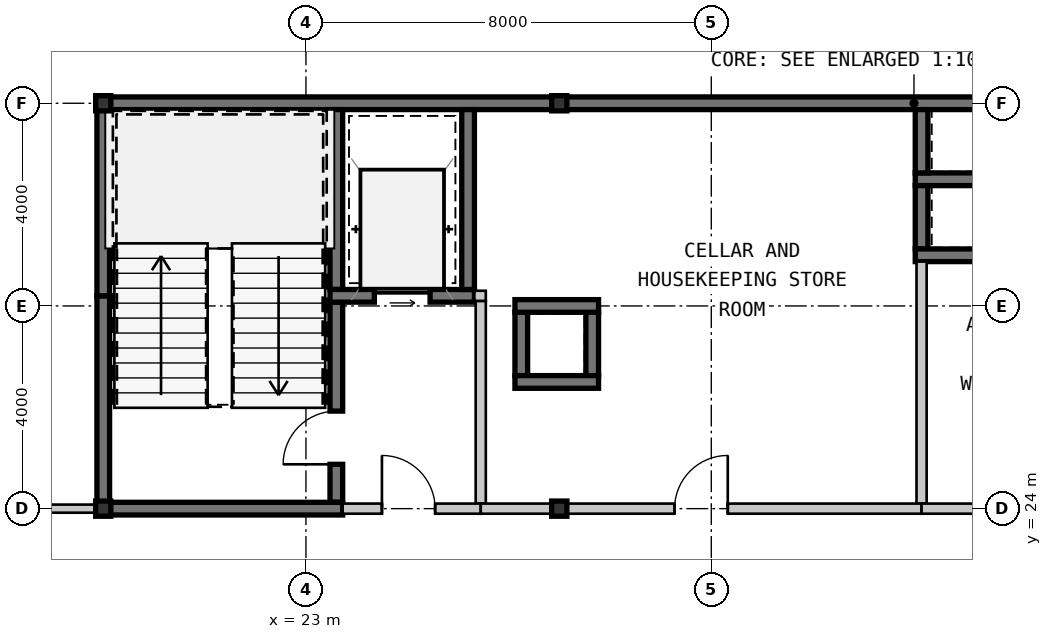
"""IFC4 building model, lengths in metres.
Left out: names, types, materials, properties, quantities, classifications, styles, units other than length and angle.
Written with IfcOpenShell. Run it as: python <this file> out.ifc"""

import sys

from ifc_helpers import new_model, si_unit, direction, frame, frame_2d, origin, origin_2d, place, context, subcontext, project, spatial, rectangle, hollow_rectangle, extrude, source, transform, mapped, element, fill, save


model = new_model("IFC4")
c1 = context("Model", 3, precision=1e-05, world=origin(), true_north=direction((0.0, 1.0)))
c2 = subcontext(c1, "Body", "Model", "MODEL_VIEW")
j1 = project(units=[si_unit("LENGTHUNIT", "METRE"), si_unit("PLANEANGLEUNIT", "RADIAN")], contexts=[c1])
p1 = place(None, origin())
s1 = spatial("IfcSite", under=j1, at=p1, CompositionType="ELEMENT")
p2 = place(p1, origin())
s2 = spatial("IfcBuilding", under=s1, at=p2, CompositionType="ELEMENT")
p3 = place(p2, frame((0.0, 0.0, 236.6)))
s3 = spatial("IfcBuildingStorey", under=s2, at=p3, CompositionType="ELEMENT", Elevation=236.6)
m1 = source(origin(), c2, "Body", "SweptSolid", [
    extrude(hollow_rectangle(XDim=0.3, YDim=0.3, WallThickness=0.012, at=origin_2d()), origin(), (0.0, 0.0, 1.0), 3.15),
])
for number, where, z_axis, x_axis in (
    (1, (19.0, 24.0, 0.0), (0.0, 0.0, 1.0), (1.0, 0.0, 0.0)),
    (2, (28.0, 24.0, 0.0), (0.0, 0.0, 1.0), (1.0, 0.0, 0.0)),
    (3, (19.0, 32.0, 0.0), (0.0, 0.0, 1.0), (1.0, 0.0, 0.0)),
    (4, (28.0, 32.0, 0.0), (0.0, 0.0, 1.0), (1.0, 0.0, 0.0)),
):
    element("IfcColumn", number, at=place(p3, frame(where, z_axis=z_axis, x_axis=x_axis)), inside=s3, PredefinedType="COLUMN", context=c2, shape_type="MappedRepresentation", body=[
        mapped(m1, transform((0.0, 0.0, 0.0), scale=1.0)),
    ])
m2 = source(origin(), c2, "Body", "SweptSolid", [
    extrude(rectangle(XDim=9.125, YDim=0.25, at=frame_2d((4.562, 0.0))), origin(), (0.0, 0.0, 1.0), 2.93),
])
p4 = place(p3, frame((18.875, 32.0, 0.0), z_axis=(0.0, 0.0, 1.0), x_axis=(1.0, 0.0, 0.0)))
e5 = element("IfcWall", 5, at=p4, inside=s3, PredefinedType="SHEAR", context=c2, shape_type="MappedRepresentation", body=[
    mapped(m2, transform((0.0, 0.0, 0.0), scale=1.0)),
])
m3 = source(origin(), c2, "Body", "SweptSolid", [
    extrude(rectangle(XDim=11.2, YDim=0.25, at=frame_2d((5.6, 0.0))), origin(), (0.0, 0.0, 1.0), 2.93),
])
p5 = place(p3, frame((28.0, 32.0, 0.0), z_axis=(0.0, 0.0, 1.0), x_axis=(1.0, 0.0, 0.0)))
e6 = element("IfcWall", 6, at=p5, inside=s3, PredefinedType="SHEAR", context=c2, shape_type="MappedRepresentation", body=[
    mapped(m3, transform((0.0, 0.0, 0.0), scale=1.0)),
])
m4 = source(origin(), c2, "Body", "SweptSolid", [
    extrude(rectangle(XDim=4.075, YDim=0.25, at=frame_2d((2.038, 0.0))), origin(), (0.0, 0.0, 1.0), 2.93),
])
p6 = place(p3, frame((19.0, 24.125, 0.0), z_axis=(0.0, 0.0, 1.0), x_axis=(0.0, 1.0, 0.0)))
e7 = element("IfcWall", 7, at=p6, inside=s3, PredefinedType="SHEAR", context=c2, shape_type="MappedRepresentation", body=[
    mapped(m4, transform((0.0, 0.0, 0.0), scale=1.0)),
])
m5 = source(origin(), c2, "Body", "SweptSolid", [
    extrude(rectangle(XDim=3.675, YDim=0.25, at=frame_2d((1.837, 0.0))), origin(), (0.0, 0.0, 1.0), 2.93),
])
p7 = place(p3, frame((19.0, 28.2, 0.0), z_axis=(0.0, 0.0, 1.0), x_axis=(0.0, 1.0, 0.0)))
e8 = element("IfcWall", 8, at=p7, inside=s3, PredefinedType="SHEAR", context=c2, shape_type="MappedRepresentation", body=[
    mapped(m5, transform((0.0, 0.0, 0.0), scale=1.0)),
])
m6 = source(origin(), c2, "Body", "SweptSolid", [
    extrude(rectangle(XDim=3.55, YDim=0.25, at=frame_2d((1.775, 0.0))), origin(), (0.0, 0.0, 1.0), 2.93),
])
p8 = place(p3, frame((23.6, 28.325, 0.0), z_axis=(0.0, 0.0, 1.0), x_axis=(0.0, 1.0, 0.0)))
e9 = element("IfcWall", 9, at=p8, inside=s3, PredefinedType="SHEAR", context=c2, shape_type="MappedRepresentation", body=[
    mapped(m6, transform((0.0, 0.0, 0.0), scale=1.0)),
])
m7 = source(origin(), c2, "Body", "SweptSolid", [
    extrude(rectangle(XDim=3.95, YDim=0.25, at=frame_2d((1.975, 0.0))), origin(), (0.0, 0.0, 1.0), 2.93),
])
p9 = place(p3, frame((23.6, 24.125, 0.0), z_axis=(0.0, 0.0, 1.0), x_axis=(0.0, 1.0, 0.0)))
e10 = element("IfcWall", 10, at=p9, inside=s3, PredefinedType="SHEAR", context=c2, shape_type="MappedRepresentation", body=[
    mapped(m7, transform((0.0, 0.0, 0.0), scale=1.0)),
])
m8 = source(origin(), c2, "Body", "SweptSolid", [
    extrude(rectangle(XDim=1.05, YDim=2.1, at=frame_2d((0.525, 1.05))), frame((0.0, 0.135, 0.0), z_axis=(0.0, -1.0, 0.0), x_axis=(1.0, 0.0, 0.0)), (0.0, 0.0, 1.0), 0.27),
])
p10 = place(p9, frame((0.75, 0.0, 0.0)))
e11 = element("IfcOpeningElement", 11, at=p10, cuts=e10, PredefinedType="OPENING", context=c2, shape_type="MappedRepresentation", body=[
    mapped(m8, transform((0.0, 0.0, 0.0), scale=1.0)),
])
m9 = source(origin(), c2, "Body", "SweptSolid", [
    extrude(rectangle(XDim=4.85, YDim=0.25, at=frame_2d((2.425, 0.0))), origin(), (0.0, 0.0, 1.0), 2.93),
])
p11 = place(p3, frame((18.875, 24.0, 0.0), z_axis=(0.0, 0.0, 1.0), x_axis=(1.0, 0.0, 0.0)))
e12 = element("IfcWall", 12, at=p11, inside=s3, PredefinedType="SHEAR", context=c2, shape_type="MappedRepresentation", body=[
    mapped(m9, transform((0.0, 0.0, 0.0), scale=1.0)),
])
m10 = source(origin(), c2, "Body", "SweptSolid", [
    extrude(rectangle(XDim=2.85, YDim=0.25, at=frame_2d((1.425, 0.0))), origin(), (0.0, 0.0, 1.0), 2.93),
])
p12 = place(p3, frame((23.475, 28.2, 0.0), z_axis=(0.0, 0.0, 1.0), x_axis=(1.0, 0.0, 0.0)))
e13 = element("IfcWall", 13, at=p12, inside=s3, PredefinedType="SHEAR", context=c2, shape_type="MappedRepresentation", body=[
    mapped(m10, transform((0.0, 0.0, 0.0), scale=1.0)),
])
m11 = source(origin(), c2, "Body", "SweptSolid", [
    extrude(rectangle(XDim=1.1, YDim=2.15, at=frame_2d((0.55, 1.075))), frame((0.0, 0.135, 0.0), z_axis=(0.0, -1.0, 0.0), x_axis=(1.0, 0.0, 0.0)), (0.0, 0.0, 1.0), 0.27),
])
p13 = place(p12, frame((0.875, 0.0, 0.0)))
e14 = element("IfcOpeningElement", 14, at=p13, cuts=e13, PredefinedType="OPENING", context=c2, shape_type="MappedRepresentation", body=[
    mapped(m11, transform((0.0, 0.0, 0.0), scale=1.0)),
])
p14 = place(p3, frame((26.2, 28.325, 0.0), z_axis=(0.0, 0.0, 1.0), x_axis=(0.0, 1.0, 0.0)))
e15 = element("IfcWall", 15, at=p14, inside=s3, PredefinedType="SHEAR", context=c2, shape_type="MappedRepresentation", body=[
    mapped(m6, transform((0.0, 0.0, 0.0), scale=1.0)),
])
m12 = source(origin(), c2, "Body", "SweptSolid", [
    extrude(rectangle(XDim=4.0, YDim=0.2, at=frame_2d((2.0, 0.0))), origin(), (0.0, 0.0, 1.0), 2.93),
])
p15 = place(p3, frame((26.45, 24.1, 0.0), z_axis=(0.0, 0.0, 1.0), x_axis=(0.0, 1.0, 0.0)))
e16 = element("IfcWall", 16, at=p15, inside=s3, PredefinedType="SOLIDWALL", context=c2, shape_type="MappedRepresentation", body=[
    mapped(m12, transform((0.0, 0.0, 0.0), scale=1.0)),
])
m13 = source(origin(), c2, "Body", "SweptSolid", [
    extrude(rectangle(XDim=2.725, YDim=0.2, at=frame_2d((1.362, 0.0))), origin(), (0.0, 0.0, 1.0), 2.47),
])
p16 = place(p3, frame((23.725, 24.0, 0.0), z_axis=(0.0, 0.0, 1.0), x_axis=(1.0, 0.0, 0.0)))
e17 = element("IfcWall", 17, at=p16, inside=s3, PredefinedType="SOLIDWALL", context=c2, shape_type="MappedRepresentation", body=[
    mapped(m13, transform((0.0, 0.0, 0.0), scale=1.0)),
])
m14 = source(origin(), c2, "Body", "SweptSolid", [
    extrude(rectangle(XDim=1.05, YDim=2.1, at=frame_2d((0.525, 1.05))), frame((0.0, 0.11, 0.0), z_axis=(0.0, -1.0, 0.0), x_axis=(1.0, 0.0, 0.0)), (0.0, 0.0, 1.0), 0.22),
])
p17 = place(p16, frame((0.775, 0.0, 0.0)))
e18 = element("IfcOpeningElement", 18, at=p17, cuts=e17, PredefinedType="OPENING", context=c2, shape_type="MappedRepresentation", body=[
    mapped(m14, transform((0.0, 0.0, 0.0), scale=1.0)),
])
m15 = source(origin(), c2, "Body", "SweptSolid", [
    extrude(rectangle(XDim=1.95, YDim=0.25, at=frame_2d((0.975, 0.0))), origin(), (0.0, 0.0, 1.0), 2.93),
])
p18 = place(p3, frame((35.025, 30.5, 0.0), z_axis=(0.0, 0.0, 1.0), x_axis=(1.0, 0.0, 0.0)))
e19 = element("IfcWall", 19, at=p18, inside=s3, PredefinedType="SHEAR", context=c2, shape_type="MappedRepresentation", body=[
    mapped(m15, transform((0.0, 0.0, 0.0), scale=1.0)),
])
m16 = source(origin(), c2, "Body", "SweptSolid", [
    extrude(rectangle(XDim=1.25, YDim=0.25, at=frame_2d((0.625, 0.0))), origin(), (0.0, 0.0, 1.0), 2.93),
])
for number, where, z_axis, x_axis in (
    (20, (35.15, 31.875, 0.0), (0.0, 0.0, 1.0), (0.0, -1.0, 0.0)),
    (21, (35.15, 30.375, 0.0), (0.0, 0.0, 1.0), (0.0, -1.0, 0.0)),
):
    element("IfcWall", number, at=place(p3, frame(where, z_axis=z_axis, x_axis=x_axis)), inside=s3, PredefinedType="SHEAR", context=c2, shape_type="MappedRepresentation", body=[
        mapped(m16, transform((0.0, 0.0, 0.0), scale=1.0)),
    ])
p19 = place(p3, frame((35.025, 29.0, 0.0), z_axis=(0.0, 0.0, 1.0), x_axis=(1.0, 0.0, 0.0)))
e22 = element("IfcWall", 22, at=p19, inside=s3, PredefinedType="SHEAR", context=c2, shape_type="MappedRepresentation", body=[
    mapped(m15, transform((0.0, 0.0, 0.0), scale=1.0)),
])
for number, where, z_axis, x_axis in (
    (23, (28.65, 26.625, 0.0), (0.0, 0.0, 1.0), (0.0, 1.0, 0.0)),
    (24, (27.25, 27.875, 0.0), (0.0, 0.0, 1.0), (0.0, -1.0, 0.0)),
):
    element("IfcWall", number, at=place(p3, frame(where, z_axis=z_axis, x_axis=x_axis)), inside=s3, PredefinedType="SHEAR", context=c2, shape_type="MappedRepresentation", body=[
        mapped(m16, transform((0.0, 0.0, 0.0), scale=1.0)),
    ])
m17 = source(origin(), c2, "Body", "SweptSolid", [
    extrude(rectangle(XDim=1.65, YDim=0.25, at=frame_2d((0.825, 0.0))), origin(), (0.0, 0.0, 1.0), 2.93),
])
for number, where, z_axis, x_axis in (
    (25, (28.775, 28.0, 0.0), (0.0, 0.0, 1.0), (-1.0, 0.0, 0.0)),
    (26, (27.125, 26.5, 0.0), (0.0, 0.0, 1.0), (1.0, 0.0, 0.0)),
):
    element("IfcWall", number, at=place(p3, frame(where, z_axis=z_axis, x_axis=x_axis)), inside=s3, PredefinedType="SHEAR", context=c2, shape_type="MappedRepresentation", body=[
        mapped(m17, transform((0.0, 0.0, 0.0), scale=1.0)),
    ])
m18 = source(origin(), c2, "Body", "SweptSolid", [
    extrude(rectangle(XDim=4.775, YDim=0.2, at=frame_2d((2.387, 0.0))), origin(), (0.0, 0.0, 1.0), 2.93),
])
p20 = place(p3, frame((35.15, 28.875, 0.0), z_axis=(0.0, 0.0, 1.0), x_axis=(0.0, -1.0, 0.0)))
e27 = element("IfcWall", 27, at=p20, inside=s3, PredefinedType="SOLIDWALL", context=c2, shape_type="MappedRepresentation", body=[
    mapped(m18, transform((0.0, 0.0, 0.0), scale=1.0)),
])
m19 = source(origin(), c2, "Body", "SweptSolid", [
    extrude(rectangle(XDim=8.7, YDim=0.2, at=frame_2d((4.35, 0.0))), origin(), (0.0, 0.0, 1.0), 2.47),
])
p21 = place(p3, frame((35.15, 24.0, 0.0), z_axis=(0.0, 0.0, 1.0), x_axis=(-1.0, 0.0, 0.0)))
e28 = element("IfcWall", 28, at=p21, inside=s3, PredefinedType="SOLIDWALL", context=c2, shape_type="MappedRepresentation", body=[
    mapped(m19, transform((0.0, 0.0, 0.0), scale=1.0)),
])
p22 = place(p21, frame((3.825, 0.0, 0.0)))
e29 = element("IfcOpeningElement", 29, at=p22, cuts=e28, PredefinedType="OPENING", context=c2, shape_type="MappedRepresentation", body=[
    mapped(m14, transform((0.0, 0.0, 0.0), scale=1.0)),
])
m20 = source(origin(), c2, "Body", "SweptSolid", [
    extrude(rectangle(XDim=4.05, YDim=0.2, at=frame_2d((2.025, 0.0))), origin(), (0.0, 0.0, 1.0), 2.47),
])
p23 = place(p3, frame((39.2, 24.0, 0.0), z_axis=(0.0, 0.0, 1.0), x_axis=(-1.0, 0.0, 0.0)))
e30 = element("IfcWall", 30, at=p23, inside=s3, PredefinedType="SOLIDWALL", context=c2, shape_type="MappedRepresentation", body=[
    mapped(m20, transform((0.0, 0.0, 0.0), scale=1.0)),
])
p24 = place(p23, frame((1.5, 0.0, 0.0)))
e31 = element("IfcOpeningElement", 31, at=p24, cuts=e30, PredefinedType="OPENING", context=c2, shape_type="MappedRepresentation", body=[
    mapped(m14, transform((0.0, 0.0, 0.0), scale=1.0)),
])
m21 = source(origin(), c2, "Body", "SweptSolid", [
    extrude(rectangle(XDim=6.032, YDim=0.16, at=frame_2d((3.016, 0.0))), origin(), (0.0, 0.0, 1.0), 2.93),
])
p25 = place(p3, frame((12.843, 24.0, 0.0), z_axis=(0.0, 0.0, 1.0), x_axis=(1.0, 0.0, 0.0)))
e32 = element("IfcWall", 32, at=p25, inside=s3, PredefinedType="PARTITIONING", context=c2, shape_type="MappedRepresentation", body=[
    mapped(m21, transform((0.0, 0.0, 0.0), scale=1.0)),
])
m22 = source(origin(), c2, "Body", "SweptSolid", [
    extrude(rectangle(XDim=0.225, YDim=0.2, at=frame_2d((0.113, 0.0))), origin(), (0.0, 0.0, 1.0), 2.93),
])
p26 = place(p3, frame((26.325, 28.2, 0.0), z_axis=(0.0, 0.0, 1.0), x_axis=(1.0, 0.0, 0.0)))
e33 = element("IfcWall", 33, at=p26, inside=s3, PredefinedType="SOLIDWALL", context=c2, shape_type="MappedRepresentation", body=[
    mapped(m22, transform((0.0, 0.0, 0.0), scale=1.0)),
])
m23 = source(origin(), c2, "Body", "SweptSolid", [
    extrude(rectangle(XDim=1.05, YDim=2.1, at=frame_2d((0.525, 1.05))), frame((0.0, 0.025, 0.0), z_axis=(0.0, -1.0, 0.0), x_axis=(1.0, 0.0, 0.0)), (0.0, 0.0, 1.0), 0.05),
])
p27 = place(p10, origin())
e34 = element("IfcDoor", 34, at=p27, inside=s3, OperationType="SINGLE_SWING_LEFT", PredefinedType="DOOR", context=c2, shape_type="MappedRepresentation", body=[
    mapped(m23, transform((0.0, 0.0, 0.0), scale=1.0)),
])
fill(e11, e34)
m24 = source(origin(), c2, "Body", "SweptSolid", [
    extrude(rectangle(XDim=1.1, YDim=2.15, at=frame_2d((0.55, 1.075))), frame((0.0, 0.025, 0.0), z_axis=(0.0, -1.0, 0.0), x_axis=(1.0, 0.0, 0.0)), (0.0, 0.0, 1.0), 0.05),
])
p28 = place(p13, origin())
e35 = element("IfcDoor", 35, at=p28, inside=s3, OperationType="SLIDING_TO_LEFT", PredefinedType="DOOR", context=c2, shape_type="MappedRepresentation", body=[
    mapped(m24, transform((0.0, 0.0, 0.0), scale=1.0)),
])
fill(e14, e35)
p29 = place(p17, origin())
e36 = element("IfcDoor", 36, at=p29, inside=s3, OperationType="SINGLE_SWING_LEFT", PredefinedType="DOOR", context=c2, shape_type="MappedRepresentation", body=[
    mapped(m23, transform((0.0, 0.0, 0.0), scale=1.0)),
])
fill(e18, e36)
p30 = place(p22, frame((1.05, 0.0, 0.0), z_axis=(0.0, 0.0, 1.0), x_axis=(-1.0, 0.0, 0.0)))
e37 = element("IfcDoor", 37, at=p30, inside=s3, OperationType="SINGLE_SWING_RIGHT", PredefinedType="DOOR", context=c2, shape_type="MappedRepresentation", body=[
    mapped(m23, transform((0.0, 0.0, 0.0), scale=1.0)),
])
fill(e29, e37)
save(model, sys.argv[1])
